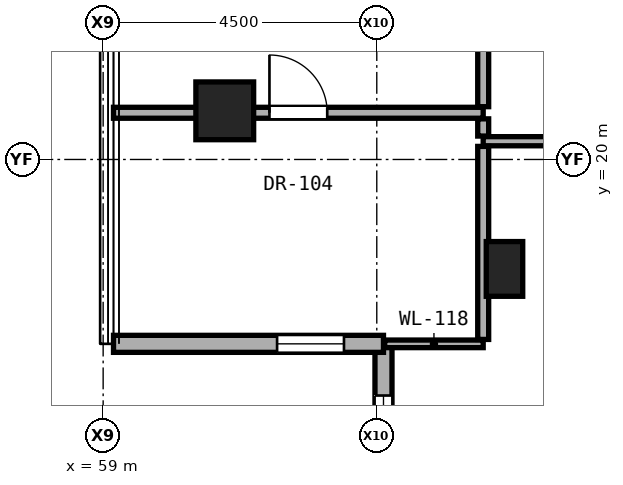
"""IFC4 building model, lengths in metres.
Left out: names, types, materials, properties, quantities, classifications, styles, units other than length and angle.
Written with IfcOpenShell. Run it as: python <this file> out.ifc"""

import sys

from ifc_helpers import new_model, si_unit, direction, frame, frame_2d, origin, origin_2d, place, context, subcontext, project, spatial, rectangle, hollow_rectangle, extrude, element, fill, save


model = new_model("IFC4")
c1 = context("Model", 3, precision=1e-05, world=origin(), true_north=direction((0.0, 1.0)))
c2 = subcontext(c1, "Body", "Model", "MODEL_VIEW")
j1 = project(units=[si_unit("LENGTHUNIT", "METRE"), si_unit("PLANEANGLEUNIT", "RADIAN")], contexts=[c1])
p1 = place(None, origin())
s1 = spatial("IfcSite", under=j1, at=p1, CompositionType="ELEMENT")
p2 = place(p1, origin())
s2 = spatial("IfcBuilding", under=s1, at=p2, CompositionType="ELEMENT")
p3 = place(p2, frame((0.0, 0.0, 196.65)))
s3 = spatial("IfcBuildingStorey", under=s2, at=p3, CompositionType="ELEMENT", Elevation=196.65)
p4 = place(p3, frame((61.0, 20.8, 0.0), z_axis=(0.0, 0.0, 1.0), x_axis=(1.0, 0.0, 0.0)))
e1 = element("IfcColumn", 1, at=p4, inside=s3, PredefinedType="COLUMN", context=c2, shape_type="SweptSolid", body=[
    extrude(hollow_rectangle(XDim=0.95, YDim=0.95, WallThickness=0.05, at=origin_2d()), origin(), (0.0, 0.0, 1.0), 3.25),
])
p5 = place(p3, frame((65.6, 18.2, 0.0), z_axis=(0.0, 0.0, 1.0), x_axis=(1.0, 0.0, 0.0)))
e2 = element("IfcColumn", 2, at=p5, inside=s3, PredefinedType="PILASTER", context=c2, shape_type="SweptSolid", body=[
    extrude(rectangle(XDim=0.6, YDim=0.9, at=origin_2d()), origin(), (0.0, 0.0, 1.0), 3.25),
])
p6 = place(p3, frame((63.61, 16.968, 0.0), z_axis=(0.0, 0.0, 1.0), x_axis=(0.0, -1.0, 0.0)))
e3 = element("IfcWall", 3, at=p6, inside=s3, PredefinedType="SOLIDWALL", context=c2, shape_type="SweptSolid", body=[
    extrude(rectangle(XDim=4.44, YDim=0.28, at=frame_2d((2.22, 0.0))), origin(), (0.0, 0.0, 1.0), 3.03),
])
p7 = place(p6, frame((0.85, 0.0, 0.68)))
e4 = element("IfcOpeningElement", 4, at=p7, cuts=e3, PredefinedType="OPENING", context=c2, shape_type="SweptSolid", body=[
    extrude(rectangle(XDim=2.1, YDim=2.2, at=frame_2d((1.05, 1.1))), frame((0.0, 0.15, 0.0), z_axis=(0.0, -1.0, 0.0), x_axis=(1.0, 0.0, 0.0)), (0.0, 0.0, 1.0), 0.3),
])
p8 = place(p3, frame((59.17, 16.968, 0.0), z_axis=(0.0, 0.0, 1.0), x_axis=(1.0, 0.0, 0.0)))
e5 = element("IfcWall", 5, at=p8, inside=s3, PredefinedType="SOLIDWALL", context=c2, shape_type="SweptSolid", body=[
    extrude(rectangle(XDim=4.44, YDim=0.28, at=frame_2d((2.22, 0.0))), origin(), (0.0, 0.0, 1.0), 3.03),
])
p9 = place(p8, frame((2.69, 0.0, 0.85)))
e6 = element("IfcOpeningElement", 6, at=p9, cuts=e5, PredefinedType="OPENING", context=c2, shape_type="SweptSolid", body=[
    extrude(rectangle(XDim=1.1, YDim=2.0, at=frame_2d((0.55, 1.0))), frame((0.0, 0.15, 0.0), z_axis=(0.0, -1.0, 0.0), x_axis=(1.0, 0.0, 0.0)), (0.0, 0.0, 1.0), 0.3),
])
p10 = place(p3, frame((63.63, 16.968, 0.0), z_axis=(0.0, 0.0, 1.0), x_axis=(1.0, 0.0, 0.0)))
e7 = element("IfcWall", 7, at=p10, inside=s3, PredefinedType="PARTITIONING", context=c2, shape_type="SweptSolid", body=[
    extrude(rectangle(XDim=1.62, YDim=0.125, at=frame_2d((0.81, 0.0))), origin(), (0.0, 0.0, 1.0), 3.05),
])
p11 = place(p3, frame((65.25, 20.3, 0.0), z_axis=(0.0, 0.0, 1.0), x_axis=(1.0, 0.0, 0.0)))
e8 = element("IfcWall", 8, at=p11, inside=s3, PredefinedType="PARTITIONING", context=c2, shape_type="SweptSolid", body=[
    extrude(rectangle(XDim=1.37, YDim=0.15, at=frame_2d((0.685, 0.0))), origin(), (0.0, 0.0, 1.0), 3.05),
])
p12 = place(p3, frame((59.17, 20.768, 0.0), z_axis=(0.0, 0.0, 1.0), x_axis=(1.0, 0.0, 0.0)))
e9 = element("IfcWall", 9, at=p12, inside=s3, PredefinedType="PARTITIONING", context=c2, shape_type="SweptSolid", body=[
    extrude(rectangle(XDim=6.08, YDim=0.18, at=frame_2d((3.04, 0.0))), origin(), (0.0, 0.0, 1.0), 2.269),
])
p13 = place(p12, frame((2.565, 0.0, 0.0)))
e10 = element("IfcOpeningElement", 10, at=p13, cuts=e9, PredefinedType="OPENING", context=c2, shape_type="SweptSolid", body=[
    extrude(rectangle(XDim=0.95, YDim=2.15, at=frame_2d((0.475, 1.075))), frame((0.0, 0.1, 0.0), z_axis=(0.0, -1.0, 0.0), x_axis=(1.0, 0.0, 0.0)), (0.0, 0.0, 1.0), 0.2),
])
p14 = place(p3, frame((65.25, 17.041, 0.0), z_axis=(0.0, 0.0, 1.0), x_axis=(0.0, 1.0, 0.0)))
e11 = element("IfcWall", 11, at=p14, inside=s3, PredefinedType="PARTITIONING", context=c2, shape_type="SweptSolid", body=[
    extrude(rectangle(XDim=3.175, YDim=0.18, at=frame_2d((1.587, 0.0))), origin(), (0.0, 0.0, 1.0), 2.493),
])
p15 = place(p3, frame((65.25, 20.385, 0.0), z_axis=(0.0, 0.0, 1.0), x_axis=(0.0, 1.0, 0.0)))
e12 = element("IfcWall", 12, at=p15, inside=s3, PredefinedType="PARTITIONING", context=c2, shape_type="SweptSolid", body=[
    extrude(rectangle(XDim=0.283, YDim=0.18, at=frame_2d((0.142, 0.0))), origin(), (0.0, 0.0, 1.0), 2.442),
])
p16 = place(p3, frame((65.25, 20.868, 0.0), z_axis=(0.0, 0.0, 1.0), x_axis=(0.0, 1.0, 0.0)))
e13 = element("IfcWall", 13, at=p16, inside=s3, PredefinedType="PARTITIONING", context=c2, shape_type="SweptSolid", body=[
    extrude(rectangle(XDim=14.747, YDim=0.18, at=frame_2d((7.374, 0.0))), origin(), (0.0, 0.0, 1.0), 2.346),
])
p17 = place(p16, frame((6.848, 0.0, 0.0)))
e14 = element("IfcOpeningElement", 14, at=p17, cuts=e13, PredefinedType="OPENING", context=c2, shape_type="SweptSolid", body=[
    extrude(rectangle(XDim=1.05, YDim=2.2, at=frame_2d((0.525, 1.1))), frame((0.0, 0.1, 0.0), z_axis=(0.0, -1.0, 0.0), x_axis=(1.0, 0.0, 0.0)), (0.0, 0.0, 1.0), 0.2),
])
p18 = place(p7, origin())
e15 = element("IfcWindow", 15, at=p18, inside=s3, PartitioningType="SINGLE_PANEL", PredefinedType="WINDOW", context=c2, shape_type="SweptSolid", body=[
    extrude(rectangle(XDim=2.1, YDim=2.2, at=frame_2d((1.05, 1.1))), frame((0.0, 0.03, 0.0), z_axis=(0.0, -1.0, 0.0), x_axis=(1.0, 0.0, 0.0)), (0.0, 0.0, 1.0), 0.06),
])
fill(e4, e15)
p19 = place(p9, origin())
e16 = element("IfcWindow", 16, at=p19, inside=s3, PartitioningType="SINGLE_PANEL", PredefinedType="WINDOW", context=c2, shape_type="SweptSolid", body=[
    extrude(rectangle(XDim=1.1, YDim=2.0, at=frame_2d((0.55, 1.0))), frame((0.0, 0.03, 0.0), z_axis=(0.0, -1.0, 0.0), x_axis=(1.0, 0.0, 0.0)), (0.0, 0.0, 1.0), 0.06),
])
fill(e6, e16)
p20 = place(p13, origin())
e17 = element("IfcDoor", 17, at=p20, inside=s3, OperationType="SINGLE_SWING_LEFT", PredefinedType="DOOR", context=c2, shape_type="SweptSolid", body=[
    extrude(rectangle(XDim=0.95, YDim=2.15, at=frame_2d((0.475, 1.075))), frame((0.0, 0.025, 0.0), z_axis=(0.0, -1.0, 0.0), x_axis=(1.0, 0.0, 0.0)), (0.0, 0.0, 1.0), 0.05),
])
fill(e10, e17)
save(model, sys.argv[1])
